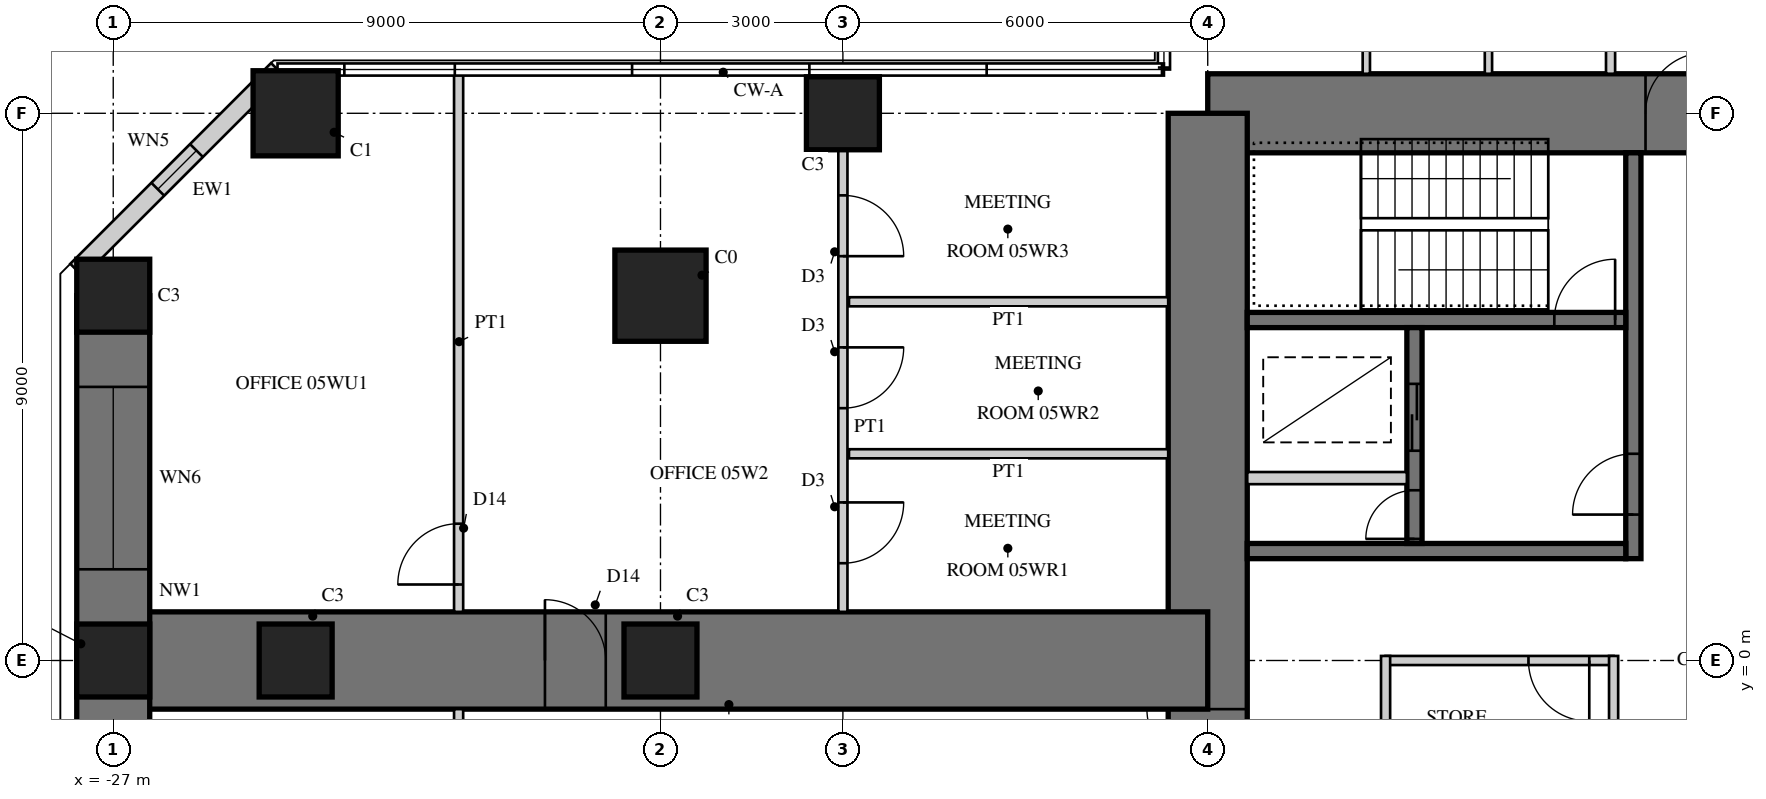
"""IFC4 building model, lengths in metres.
Left out: names, types, materials, properties, quantities, classifications, styles, units other than length and angle.
Written with IfcOpenShell. Run it as: python <this file> out.ifc"""

import sys

from ifc_helpers import new_model, si_unit, direction, frame, frame_2d, origin, origin_2d, place, context, subcontext, project, spatial, rectangle, hollow_rectangle, extrude, element, fill, save


model = new_model("IFC4")
c1 = context("Model", 3, precision=1e-05, world=origin(), true_north=direction((0.0, 1.0)))
c2 = subcontext(c1, "Body", "Model", "MODEL_VIEW")
j1 = project(units=[si_unit("LENGTHUNIT", "METRE"), si_unit("PLANEANGLEUNIT", "RADIAN")], contexts=[c1])
p1 = place(None, origin())
s1 = spatial("IfcSite", under=j1, at=p1, CompositionType="ELEMENT")
p2 = place(p1, origin())
s2 = spatial("IfcBuilding", under=s1, at=p2, CompositionType="ELEMENT")
p3 = place(p2, frame((0.0, 0.0, 23.5)))
s3 = spatial("IfcBuildingStorey", under=s2, at=p3, CompositionType="ELEMENT", Elevation=23.5)
p4 = place(p3, frame((9.0, 9.0, 0.0), z_axis=(0.0, 0.0, 1.0), x_axis=(-1.0, 0.0, 0.0)))
e1 = element("IfcWall", 1, at=p4, inside=s3, PredefinedType="SHEAR", context=c2, shape_type="SweptSolid", body=[
    extrude(rectangle(XDim=18.0, YDim=1.3, at=frame_2d((9.0, 0.0))), origin(), (0.0, 0.0, 1.0), 4.0),
])
p5 = place(p4, frame((9.8, 0.0, 0.0)))
e2 = element("IfcOpeningElement", 2, at=p5, cuts=e1, PredefinedType="OPENING", context=c2, shape_type="SweptSolid", body=[
    extrude(rectangle(XDim=1.0, YDim=2.4, at=frame_2d((0.5, 1.2))), frame((0.0, 0.66, 0.0), z_axis=(0.0, -1.0, 0.0), x_axis=(1.0, 0.0, 0.0)), (0.0, 0.0, 1.0), 1.32),
])
p6 = place(p3, frame((-9.0, 9.0, 0.0), z_axis=(0.0, 0.0, 1.0), x_axis=(0.0, -1.0, 0.0)))
e3 = element("IfcWall", 3, at=p6, inside=s3, PredefinedType="SHEAR", context=c2, shape_type="SweptSolid", body=[
    extrude(rectangle(XDim=18.0, YDim=1.3, at=frame_2d((9.0, 0.0))), origin(), (0.0, 0.0, 1.0), 4.0),
])
p7 = place(p6, frame((9.8, 0.0, 0.0)))
e4 = element("IfcOpeningElement", 4, at=p7, cuts=e3, PredefinedType="OPENING", context=c2, shape_type="SweptSolid", body=[
    extrude(rectangle(XDim=1.0, YDim=2.4, at=frame_2d((0.5, 1.2))), frame((0.0, 0.66, 0.0), z_axis=(0.0, -1.0, 0.0), x_axis=(1.0, 0.0, 0.0)), (0.0, 0.0, 1.0), 1.32),
])
p8 = place(p3, frame((-2.0, 1.675, 0.0), z_axis=(0.0, 0.0, 1.0), x_axis=(0.0, 1.0, 0.0)))
e5 = element("IfcWall", 5, at=p8, inside=s3, PredefinedType="SHEAR", context=c2, shape_type="SweptSolid", body=[
    extrude(rectangle(XDim=6.675, YDim=0.25, at=frame_2d((3.337, 0.0))), origin(), (0.0, 0.0, 1.0), 4.0),
])
p9 = place(p8, frame((0.725, 0.0, 0.0)))
e6 = element("IfcOpeningElement", 6, at=p9, cuts=e5, PredefinedType="OPENING", context=c2, shape_type="SweptSolid", body=[
    extrude(rectangle(XDim=1.0, YDim=2.1, at=frame_2d((0.5, 1.05))), frame((0.0, 0.135, 0.0), z_axis=(0.0, -1.0, 0.0), x_axis=(1.0, 0.0, 0.0)), (0.0, 0.0, 1.0), 0.27),
])
p10 = place(p3, frame((-2.125, 1.8, 0.0), z_axis=(0.0, 0.0, 1.0), x_axis=(-1.0, 0.0, 0.0)))
e7 = element("IfcWall", 7, at=p10, inside=s3, PredefinedType="SHEAR", context=c2, shape_type="SweptSolid", body=[
    extrude(rectangle(XDim=6.225, YDim=0.25, at=frame_2d((3.113, 0.0))), origin(), (0.0, 0.0, 1.0), 4.0),
])
p11 = place(p3, frame((-2.125, 5.6, 0.0), z_axis=(0.0, 0.0, 1.0), x_axis=(-1.0, 0.0, 0.0)))
e8 = element("IfcWall", 8, at=p11, inside=s3, PredefinedType="SHEAR", context=c2, shape_type="SweptSolid", body=[
    extrude(rectangle(XDim=6.225, YDim=0.25, at=frame_2d((3.113, 0.0))), origin(), (0.0, 0.0, 1.0), 4.0),
])
p12 = place(p11, frame((0.175, 0.0, 0.0)))
e9 = element("IfcOpeningElement", 9, at=p12, cuts=e8, PredefinedType="OPENING", context=c2, shape_type="SweptSolid", body=[
    extrude(rectangle(XDim=1.0, YDim=2.1, at=frame_2d((0.5, 1.05))), frame((0.0, 0.135, 0.0), z_axis=(0.0, -1.0, 0.0), x_axis=(1.0, 0.0, 0.0)), (0.0, 0.0, 1.0), 0.27),
])
p13 = place(p3, frame((-5.6, 1.925, 0.0), z_axis=(0.0, 0.0, 1.0), x_axis=(0.0, 1.0, 0.0)))
e10 = element("IfcWall", 10, at=p13, inside=s3, PredefinedType="SHEAR", context=c2, shape_type="SweptSolid", body=[
    extrude(rectangle(XDim=3.55, YDim=0.25, at=frame_2d((1.775, 0.0))), origin(), (0.0, 0.0, 1.0), 4.0),
])
p14 = place(p13, frame((1.525, 0.0, 0.0)))
e11 = element("IfcOpeningElement", 11, at=p14, cuts=e10, PredefinedType="OPENING", context=c2, shape_type="SweptSolid", body=[
    extrude(rectangle(XDim=1.1, YDim=2.2, at=frame_2d((0.55, 1.1))), frame((0.0, 0.135, 0.0), z_axis=(0.0, -1.0, 0.0), x_axis=(1.0, 0.0, 0.0)), (0.0, 0.0, 1.0), 0.27),
])
p15 = place(p13, frame((0.075, 0.0, 0.0)))
e12 = element("IfcOpeningElement", 12, at=p15, cuts=e10, PredefinedType="OPENING", context=c2, shape_type="SweptSolid", body=[
    extrude(rectangle(XDim=0.8, YDim=2.1, at=frame_2d((0.4, 1.05))), frame((0.0, 0.135, 0.0), z_axis=(0.0, -1.0, 0.0), x_axis=(1.0, 0.0, 0.0)), (0.0, 0.0, 1.0), 0.27),
])
p16 = place(p3, frame((-5.725, 3.0, 0.0), z_axis=(0.0, 0.0, 1.0), x_axis=(-1.0, 0.0, 0.0)))
e13 = element("IfcWall", 13, at=p16, inside=s3, PredefinedType="PARTITIONING", context=c2, shape_type="SweptSolid", body=[
    extrude(rectangle(XDim=2.625, YDim=0.2, at=frame_2d((1.312, 0.0))), origin(), (0.0, 0.0, 1.0), 4.0),
])
p17 = place(p3, frame((-9.0, 0.0, 0.0), z_axis=(0.0, 0.0, 1.0), x_axis=(-1.0, 0.0, 0.0)))
e14 = element("IfcWall", 14, at=p17, inside=s3, PredefinedType="SHEAR", context=c2, shape_type="SweptSolid", body=[
    extrude(rectangle(XDim=18.0, YDim=1.6, at=frame_2d((9.0, 0.0))), origin(), (0.0, 0.0, 1.0), 4.0),
])
p18 = place(p17, frame((9.9, 0.0, 0.0)))
e15 = element("IfcOpeningElement", 15, at=p18, cuts=e14, PredefinedType="OPENING", context=c2, shape_type="SweptSolid", body=[
    extrude(rectangle(XDim=1.0, YDim=2.2, at=frame_2d((0.5, 1.1))), frame((0.0, 0.81, 0.0), z_axis=(0.0, -1.0, 0.0), x_axis=(1.0, 0.0, 0.0)), (0.0, 0.0, 1.0), 1.62),
])
p19 = place(p3, frame((-27.0, 6.0, 0.0), z_axis=(0.0, 0.0, 1.0), x_axis=(0.0, -1.0, 0.0)))
e16 = element("IfcWall", 16, at=p19, inside=s3, PredefinedType="SHEAR", context=c2, shape_type="SweptSolid", body=[
    extrude(rectangle(XDim=12.0, YDim=1.2, at=frame_2d((6.0, 0.0))), origin(), (0.0, 0.0, 1.0), 4.0),
])
p20 = place(p19, frame((1.5, 0.0, 0.6)))
e17 = element("IfcOpeningElement", 17, at=p20, cuts=e16, PredefinedType="OPENING", context=c2, shape_type="SweptSolid", body=[
    extrude(rectangle(XDim=3.0, YDim=2.4, at=frame_2d((1.5, 1.2))), frame((0.0, 0.61, 0.0), z_axis=(0.0, -1.0, 0.0), x_axis=(1.0, 0.0, 0.0)), (0.0, 0.0, 1.0), 1.22),
])
p21 = place(p19, frame((7.5, 0.0, 0.6)))
e18 = element("IfcOpeningElement", 18, at=p21, cuts=e16, PredefinedType="OPENING", context=c2, shape_type="SweptSolid", body=[
    extrude(rectangle(XDim=3.0, YDim=2.4, at=frame_2d((1.5, 1.2))), frame((0.0, 0.61, 0.0), z_axis=(0.0, -1.0, 0.0), x_axis=(1.0, 0.0, 0.0)), (0.0, 0.0, 1.0), 1.22),
])
p22 = place(p3, frame((-15.0, 9.0, 0.0), z_axis=(0.0, 0.0, 1.0), x_axis=(1.0, 0.0, 0.0)))
e19 = element("IfcColumn", 19, at=p22, inside=s3, PredefinedType="COLUMN", context=c2, shape_type="SweptSolid", body=[
    extrude(rectangle(XDim=1.2, YDim=1.2, at=origin_2d()), origin(), (0.0, 0.0, 1.0), 4.0),
])
p23 = place(p3, frame((-24.0, 9.0, 0.0), z_axis=(0.0, 0.0, 1.0), x_axis=(1.0, 0.0, 0.0)))
e20 = element("IfcColumn", 20, at=p23, inside=s3, PredefinedType="COLUMN", context=c2, shape_type="SweptSolid", body=[
    extrude(rectangle(XDim=1.4, YDim=1.4, at=origin_2d()), origin(), (0.0, 0.0, 1.0), 4.0),
])
for number, where, z_axis, x_axis in (
    (21, (-27.0, 6.0, 0.0), (0.0, 0.0, 1.0), (1.0, 0.0, 0.0)),
    (22, (-27.0, 0.0, 0.0), (0.0, 0.0, 1.0), (1.0, 0.0, 0.0)),
):
    element("IfcColumn", number, at=place(p3, frame(where, z_axis=z_axis, x_axis=x_axis)), inside=s3, PredefinedType="COLUMN", context=c2, shape_type="SweptSolid", body=[
        extrude(rectangle(XDim=1.2, YDim=1.2, at=origin_2d()), origin(), (0.0, 0.0, 1.0), 4.0),
    ])
p24 = place(p3, frame((-18.0, 6.0, -0.2), z_axis=(0.0, 0.0, 1.0), x_axis=(1.0, 0.0, 0.0)))
e23 = element("IfcColumn", 23, at=p24, inside=s3, PredefinedType="COLUMN", context=c2, shape_type="SweptSolid", body=[
    extrude(rectangle(XDim=1.5, YDim=1.5, at=origin_2d()), origin(), (0.0, 0.0, 1.0), 4.2),
])
for number, where, z_axis, x_axis in (
    (24, (-18.0, 0.0, 0.0), (0.0, 0.0, 1.0), (1.0, 0.0, 0.0)),
    (25, (-24.0, 0.0, 0.0), (0.0, 0.0, 1.0), (1.0, 0.0, 0.0)),
):
    element("IfcColumn", number, at=place(p3, frame(where, z_axis=z_axis, x_axis=x_axis)), inside=s3, PredefinedType="COLUMN", context=c2, shape_type="SweptSolid", body=[
        extrude(rectangle(XDim=1.2, YDim=1.2, at=origin_2d()), origin(), (0.0, 0.0, 1.0), 4.0),
    ])
p25 = place(p3, frame((-24.298, 9.72, 0.0), z_axis=(0.0, 0.0, 1.0), x_axis=(-0.707106781187, -0.707106781187, 0.0)))
e26 = element("IfcWall", 26, at=p25, inside=s3, PredefinedType="SOLIDWALL", context=c2, shape_type="SweptSolid", body=[
    extrude(rectangle(XDim=4.669, YDim=0.3, at=frame_2d((2.335, 0.0))), origin(), (0.0, 0.0, 1.0), 3.8),
])
p26 = place(p25, frame((1.885, 0.0, 0.3)))
e27 = element("IfcOpeningElement", 27, at=p26, cuts=e26, PredefinedType="OPENING", context=c2, shape_type="SweptSolid", body=[
    extrude(rectangle(XDim=0.9, YDim=2.4, at=frame_2d((0.45, 1.2))), frame((0.0, 0.16, 0.0), z_axis=(0.0, -1.0, 0.0), x_axis=(1.0, 0.0, 0.0)), (0.0, 0.0, 1.0), 0.32),
])
p27 = place(p3, frame((-2.325, 0.0, 0.0), z_axis=(0.0, 0.0, 1.0), x_axis=(-1.0, 0.0, 0.0)))
e28 = element("IfcWall", 28, at=p27, inside=s3, PredefinedType="PARTITIONING", context=c2, shape_type="SweptSolid", body=[
    extrude(rectangle(XDim=3.75, YDim=0.15, at=frame_2d((1.875, 0.0))), origin(), (0.0, 0.0, 1.0), 3.8),
])
p28 = place(p27, frame((0.4, 0.0, 0.0)))
e29 = element("IfcOpeningElement", 29, at=p28, cuts=e28, PredefinedType="OPENING", context=c2, shape_type="SweptSolid", body=[
    extrude(rectangle(XDim=1.0, YDim=2.1, at=frame_2d((0.5, 1.05))), frame((0.0, 0.085, 0.0), z_axis=(0.0, -1.0, 0.0), x_axis=(1.0, 0.0, 0.0)), (0.0, 0.0, 1.0), 0.17),
])
for number, where, z_axis, x_axis in (
    (30, (-2.325, -1.875, 0.0), (0.0, 0.0, 1.0), (0.0, 1.0, 0.0)),
    (31, (-6.075, 0.075, 0.0), (0.0, 0.0, 1.0), (0.0, -1.0, 0.0)),
):
    element("IfcWall", number, at=place(p3, frame(where, z_axis=z_axis, x_axis=x_axis)), inside=s3, PredefinedType="PARTITIONING", context=c2, shape_type="SweptSolid", body=[
        extrude(rectangle(XDim=1.95, YDim=0.15, at=frame_2d((0.975, 0.0))), origin(), (0.0, 0.0, 1.0), 3.8),
    ])
p29 = place(p3, frame((-2.375, 9.65, 0.0), z_axis=(0.0, 0.0, 1.0), x_axis=(0.0, 1.0, 0.0)))
e32 = element("IfcWall", 32, at=p29, inside=s3, PredefinedType="PARTITIONING", context=c2, shape_type="SweptSolid", body=[
    extrude(rectangle(XDim=5.35, YDim=0.15, at=frame_2d((2.675, 0.0))), origin(), (0.0, 0.0, 1.0), 3.8),
])
for number, where, z_axis, x_axis in (
    (33, (-4.383, 9.65, 0.0), (0.0, 0.0, 1.0), (0.0, 1.0, 0.0)),
    (34, (-6.392, 9.65, 0.0), (0.0, 0.0, 1.0), (0.0, 1.0, 0.0)),
):
    element("IfcWall", number, at=place(p3, frame(where, z_axis=z_axis, x_axis=x_axis)), inside=s3, PredefinedType="PLUMBINGWALL", context=c2, shape_type="SweptSolid", body=[
        extrude(rectangle(XDim=5.25, YDim=0.12, at=frame_2d((2.625, 0.0))), origin(), (0.0, 0.0, 1.0), 3.8),
    ])
p30 = place(p3, frame((-15.0, 8.4, 0.0), z_axis=(0.0, 0.0, 1.0), x_axis=(0.0, -1.0, 0.0)))
e35 = element("IfcWall", 35, at=p30, inside=s3, PredefinedType="PARTITIONING", context=c2, shape_type="SweptSolid", body=[
    extrude(rectangle(XDim=7.6, YDim=0.15, at=frame_2d((3.8, 0.0))), origin(), (0.0, 0.0, 1.0), 2.95),
])
p31 = place(p30, frame((0.75, 0.0, 0.0)))
e36 = element("IfcOpeningElement", 36, at=p31, cuts=e35, PredefinedType="OPENING", context=c2, shape_type="SweptSolid", body=[
    extrude(rectangle(XDim=1.0, YDim=2.1, at=frame_2d((0.5, 1.05))), frame((0.0, 0.085, 0.0), z_axis=(0.0, -1.0, 0.0), x_axis=(1.0, 0.0, 0.0)), (0.0, 0.0, 1.0), 0.17),
])
p32 = place(p30, frame((3.25, 0.0, 0.0)))
e37 = element("IfcOpeningElement", 37, at=p32, cuts=e35, PredefinedType="OPENING", context=c2, shape_type="SweptSolid", body=[
    extrude(rectangle(XDim=1.0, YDim=2.1, at=frame_2d((0.5, 1.05))), frame((0.0, 0.085, 0.0), z_axis=(0.0, -1.0, 0.0), x_axis=(1.0, 0.0, 0.0)), (0.0, 0.0, 1.0), 0.17),
])
p33 = place(p30, frame((5.8, 0.0, 0.0)))
e38 = element("IfcOpeningElement", 38, at=p33, cuts=e35, PredefinedType="OPENING", context=c2, shape_type="SweptSolid", body=[
    extrude(rectangle(XDim=1.0, YDim=2.1, at=frame_2d((0.5, 1.05))), frame((0.0, 0.085, 0.0), z_axis=(0.0, -1.0, 0.0), x_axis=(1.0, 0.0, 0.0)), (0.0, 0.0, 1.0), 0.17),
])
p34 = place(p3, frame((-9.65, 3.4, 0.0), z_axis=(0.0, 0.0, 1.0), x_axis=(-1.0, 0.0, 0.0)))
e39 = element("IfcWall", 39, at=p34, inside=s3, PredefinedType="PARTITIONING", context=c2, shape_type="SweptSolid", body=[
    extrude(rectangle(XDim=5.25, YDim=0.15, at=frame_2d((2.625, 0.0))), origin(), (0.0, 0.0, 1.0), 3.8),
])
p35 = place(p3, frame((-9.65, 5.9, 0.0), z_axis=(0.0, 0.0, 1.0), x_axis=(-1.0, 0.0, 0.0)))
e40 = element("IfcWall", 40, at=p35, inside=s3, PredefinedType="PARTITIONING", context=c2, shape_type="SweptSolid", body=[
    extrude(rectangle(XDim=5.25, YDim=0.15, at=frame_2d((2.625, 0.0))), origin(), (0.0, 0.0, 1.0), 3.0),
])
p36 = place(p3, frame((-21.32, -0.8, 0.0), z_axis=(0.0, 0.0, 1.0), x_axis=(0.0, -1.0, 0.0)))
e41 = element("IfcWall", 41, at=p36, inside=s3, PredefinedType="PARTITIONING", context=c2, shape_type="SweptSolid", body=[
    extrude(rectangle(XDim=8.88, YDim=0.15, at=frame_2d((4.44, 0.0))), origin(), (0.0, 0.0, 1.0), 3.8),
])
p37 = place(p36, frame((0.45, 0.0, 0.0)))
e42 = element("IfcOpeningElement", 42, at=p37, cuts=e41, PredefinedType="OPENING", context=c2, shape_type="SweptSolid", body=[
    extrude(rectangle(XDim=1.0, YDim=2.2, at=frame_2d((0.5, 1.1))), frame((0.0, 0.085, 0.0), z_axis=(0.0, -1.0, 0.0), x_axis=(1.0, 0.0, 0.0)), (0.0, 0.0, 1.0), 0.17),
])
p38 = place(p3, frame((-21.32, 9.68, 0.0), z_axis=(0.0, 0.0, 1.0), x_axis=(0.0, -1.0, 0.0)))
e43 = element("IfcWall", 43, at=p38, inside=s3, PredefinedType="PARTITIONING", context=c2, shape_type="SweptSolid", body=[
    extrude(rectangle(XDim=8.88, YDim=0.15, at=frame_2d((4.44, 0.0))), origin(), (0.0, 0.0, 1.0), 3.8),
])
p39 = place(p38, frame((7.43, 0.0, 0.0)))
e44 = element("IfcOpeningElement", 44, at=p39, cuts=e43, PredefinedType="OPENING", context=c2, shape_type="SweptSolid", body=[
    extrude(rectangle(XDim=1.0, YDim=2.2, at=frame_2d((0.5, 1.1))), frame((0.0, 0.085, 0.0), z_axis=(0.0, -1.0, 0.0), x_axis=(1.0, 0.0, 0.0)), (0.0, 0.0, 1.0), 0.17),
])
p40 = place(p26, origin())
e45 = element("IfcWindow", 45, at=p40, inside=s3, PartitioningType="SINGLE_PANEL", PredefinedType="WINDOW", context=c2, shape_type="SweptSolid", body=[
    extrude(hollow_rectangle(XDim=0.9, YDim=2.4, WallThickness=0.06, at=frame_2d((0.45, 1.2))), frame((0.0, 0.03, 0.0), z_axis=(0.0, -1.0, 0.0), x_axis=(1.0, 0.0, 0.0)), (0.0, 0.0, 1.0), 0.06),
    extrude(rectangle(XDim=0.779, YDim=2.279, at=frame_2d((0.45, 1.2))), frame((0.0, 0.03, 0.0), z_axis=(0.0, -1.0, 0.0), x_axis=(1.0, 0.0, 0.0)), (0.0, 0.0, 1.0), 0.06),
])
fill(e27, e45)
p41 = place(p20, origin())
e46 = element("IfcWindow", 46, at=p41, inside=s3, PartitioningType="SINGLE_PANEL", PredefinedType="WINDOW", context=c2, shape_type="SweptSolid", body=[
    extrude(hollow_rectangle(XDim=3.0, YDim=2.4, WallThickness=0.06, at=frame_2d((1.5, 1.2))), frame((0.0, 0.03, 0.0), z_axis=(0.0, -1.0, 0.0), x_axis=(1.0, 0.0, 0.0)), (0.0, 0.0, 1.0), 0.06),
    extrude(rectangle(XDim=2.879, YDim=2.279, at=frame_2d((1.5, 1.2))), frame((0.0, 0.03, 0.0), z_axis=(0.0, -1.0, 0.0), x_axis=(1.0, 0.0, 0.0)), (0.0, 0.0, 1.0), 0.06),
])
fill(e17, e46)
p42 = place(p28, origin())
e47 = element("IfcDoor", 47, at=p42, inside=s3, OperationType="SINGLE_SWING_LEFT", PredefinedType="DOOR", context=c2, shape_type="SweptSolid", body=[
    extrude(rectangle(XDim=1.0, YDim=2.1, at=frame_2d((0.5, 1.05))), frame((0.0, 0.025, 0.0), z_axis=(0.0, -1.0, 0.0), x_axis=(1.0, 0.0, 0.0)), (0.0, 0.0, 1.0), 0.05),
])
fill(e29, e47)
p43 = place(p31, origin())
e48 = element("IfcDoor", 48, at=p43, inside=s3, OperationType="SINGLE_SWING_RIGHT", PredefinedType="DOOR", context=c2, shape_type="SweptSolid", body=[
    extrude(rectangle(XDim=1.0, YDim=2.1, at=frame_2d((0.5, 1.05))), frame((0.0, 0.025, 0.0), z_axis=(0.0, -1.0, 0.0), x_axis=(1.0, 0.0, 0.0)), (0.0, 0.0, 1.0), 0.05),
])
fill(e36, e48)
p44 = place(p32, origin())
e49 = element("IfcDoor", 49, at=p44, inside=s3, OperationType="SINGLE_SWING_LEFT", PredefinedType="DOOR", context=c2, shape_type="SweptSolid", body=[
    extrude(rectangle(XDim=1.0, YDim=2.1, at=frame_2d((0.5, 1.05))), frame((0.0, 0.025, 0.0), z_axis=(0.0, -1.0, 0.0), x_axis=(1.0, 0.0, 0.0)), (0.0, 0.0, 1.0), 0.05),
])
fill(e37, e49)
p45 = place(p33, origin())
e50 = element("IfcDoor", 50, at=p45, inside=s3, OperationType="SINGLE_SWING_LEFT", PredefinedType="DOOR", context=c2, shape_type="SweptSolid", body=[
    extrude(rectangle(XDim=1.0, YDim=2.1, at=frame_2d((0.5, 1.05))), frame((0.0, 0.025, 0.0), z_axis=(0.0, -1.0, 0.0), x_axis=(1.0, 0.0, 0.0)), (0.0, 0.0, 1.0), 0.05),
])
fill(e38, e50)
p46 = place(p39, frame((1.0, 0.0, 0.0), z_axis=(0.0, 0.0, 1.0), x_axis=(-1.0, 0.0, 0.0)))
e51 = element("IfcDoor", 51, at=p46, inside=s3, OperationType="SINGLE_SWING_LEFT", PredefinedType="DOOR", context=c2, shape_type="SweptSolid", body=[
    extrude(rectangle(XDim=1.0, YDim=2.2, at=frame_2d((0.5, 1.1))), frame((0.0, 0.025, 0.0), z_axis=(0.0, -1.0, 0.0), x_axis=(1.0, 0.0, 0.0)), (0.0, 0.0, 1.0), 0.05),
])
fill(e44, e51)
p47 = place(p18, frame((1.0, 0.0, 0.0), z_axis=(0.0, 0.0, 1.0), x_axis=(-1.0, 0.0, 0.0)))
e52 = element("IfcDoor", 52, at=p47, inside=s3, OperationType="SINGLE_SWING_LEFT", PredefinedType="DOOR", context=c2, shape_type="SweptSolid", body=[
    extrude(rectangle(XDim=1.0, YDim=2.2, at=frame_2d((0.5, 1.1))), frame((0.0, 0.025, 0.0), z_axis=(0.0, -1.0, 0.0), x_axis=(1.0, 0.0, 0.0)), (0.0, 0.0, 1.0), 0.05),
])
fill(e15, e52)
p48 = place(p5, frame((1.0, 0.0, 0.0), z_axis=(0.0, 0.0, 1.0), x_axis=(-1.0, 0.0, 0.0)))
e53 = element("IfcDoor", 53, at=p48, inside=s3, OperationType="SINGLE_SWING_RIGHT", PredefinedType="DOOR", context=c2, shape_type="SweptSolid", body=[
    extrude(rectangle(XDim=1.0, YDim=2.4, at=frame_2d((0.5, 1.2))), frame((0.0, -0.005, 0.0), z_axis=(0.0, -1.0, 0.0), x_axis=(1.0, 0.0, 0.0)), (0.0, 0.0, 1.0), 0.05),
])
fill(e2, e53)
p49 = place(p7, frame((1.0, 0.0, 0.0), z_axis=(0.0, 0.0, 1.0), x_axis=(-1.0, 0.0, 0.0)))
e54 = element("IfcDoor", 54, at=p49, inside=s3, OperationType="SINGLE_SWING_RIGHT", PredefinedType="DOOR", context=c2, shape_type="SweptSolid", body=[
    extrude(rectangle(XDim=1.0, YDim=2.4, at=frame_2d((0.5, 1.2))), frame((0.0, -0.005, 0.0), z_axis=(0.0, -1.0, 0.0), x_axis=(1.0, 0.0, 0.0)), (0.0, 0.0, 1.0), 0.05),
])
fill(e4, e54)
p50 = place(p9, origin())
e55 = element("IfcDoor", 55, at=p50, inside=s3, OperationType="SINGLE_SWING_LEFT", PredefinedType="DOOR", context=c2, shape_type="SweptSolid", body=[
    extrude(rectangle(XDim=1.0, YDim=2.1, at=frame_2d((0.5, 1.05))), frame((0.0, 0.025, 0.0), z_axis=(0.0, -1.0, 0.0), x_axis=(1.0, 0.0, 0.0)), (0.0, 0.0, 1.0), 0.05),
])
fill(e6, e55)
p51 = place(p12, frame((1.0, 0.0, 0.0), z_axis=(0.0, 0.0, 1.0), x_axis=(-1.0, 0.0, 0.0)))
e56 = element("IfcDoor", 56, at=p51, inside=s3, OperationType="SINGLE_SWING_RIGHT", PredefinedType="DOOR", context=c2, shape_type="SweptSolid", body=[
    extrude(rectangle(XDim=1.0, YDim=2.1, at=frame_2d((0.5, 1.05))), frame((0.0, 0.025, 0.0), z_axis=(0.0, -1.0, 0.0), x_axis=(1.0, 0.0, 0.0)), (0.0, 0.0, 1.0), 0.05),
])
fill(e9, e56)
p52 = place(p14, origin())
e57 = element("IfcDoor", 57, at=p52, inside=s3, OperationType="DOUBLE_DOOR_SLIDING", PredefinedType="DOOR", context=c2, shape_type="SweptSolid", body=[
    extrude(rectangle(XDim=1.1, YDim=2.2, at=frame_2d((0.55, 1.1))), frame((0.0, 0.025, 0.0), z_axis=(0.0, -1.0, 0.0), x_axis=(1.0, 0.0, 0.0)), (0.0, 0.0, 1.0), 0.05),
])
fill(e11, e57)
p53 = place(p15, origin())
e58 = element("IfcDoor", 58, at=p53, inside=s3, OperationType="SINGLE_SWING_LEFT", PredefinedType="DOOR", context=c2, shape_type="SweptSolid", body=[
    extrude(rectangle(XDim=0.8, YDim=2.1, at=frame_2d((0.4, 1.05))), frame((0.0, 0.025, 0.0), z_axis=(0.0, -1.0, 0.0), x_axis=(1.0, 0.0, 0.0)), (0.0, 0.0, 1.0), 0.05),
])
fill(e12, e58)
save(model, sys.argv[1])
